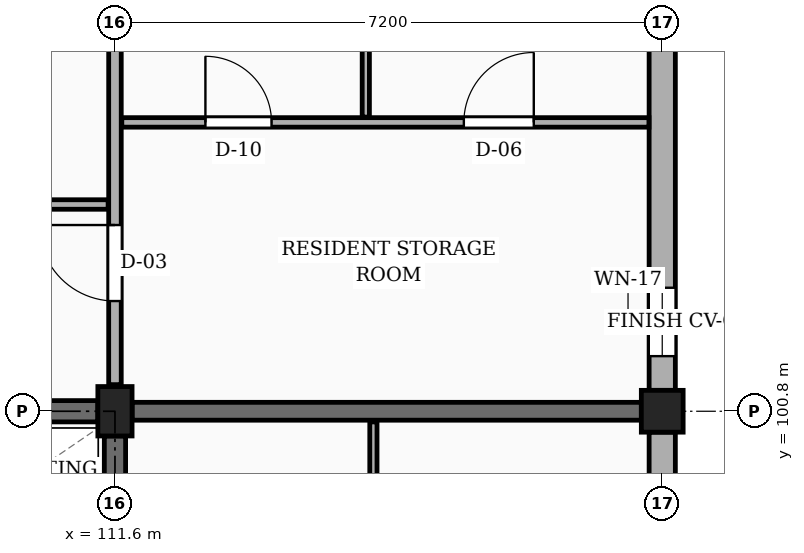
"""IFC4 building model, lengths in metres.
Left out: names, types, materials, properties, quantities, classifications, styles, units other than length and angle.
Written with IfcOpenShell. Run it as: python <this file> out.ifc"""

import sys

from ifc_helpers import new_model, si_unit, direction, frame, frame_2d, origin, origin_2d, place, context, subcontext, project, spatial, rectangle, extrude, element, fill, save


model = new_model("IFC4")
c1 = context("Model", 3, precision=1e-05, world=origin(), true_north=direction((0.0, 1.0)))
c2 = subcontext(c1, "Body", "Model", "MODEL_VIEW")
j1 = project(units=[si_unit("LENGTHUNIT", "METRE"), si_unit("PLANEANGLEUNIT", "RADIAN")], contexts=[c1])
p1 = place(None, origin())
s1 = spatial("IfcSite", under=j1, at=p1, CompositionType="ELEMENT")
p2 = place(p1, origin())
s2 = spatial("IfcBuilding", under=s1, at=p2, CompositionType="ELEMENT")
p3 = place(p2, frame((0.0, 0.0, 20.25)))
s3 = spatial("IfcBuildingStorey", under=s2, at=p3, CompositionType="ELEMENT", Elevation=20.25)
p4 = place(p3, frame((111.6, 100.8, 0.0), z_axis=(0.0, 0.0, 1.0), x_axis=(1.0, 0.0, 0.0)))
e1 = element("IfcColumn", 1, at=p4, inside=s3, PredefinedType="COLUMN", context=c2, shape_type="SweptSolid", body=[
    extrude(rectangle(XDim=0.45, YDim=0.65, at=origin_2d()), origin(), (0.0, 0.0, 1.0), 3.15),
])
p5 = place(p3, frame((118.8, 100.8, 0.0), z_axis=(0.0, 0.0, 1.0), x_axis=(1.0, 0.0, 0.0)))
e2 = element("IfcColumn", 2, at=p5, inside=s3, PredefinedType="COLUMN", context=c2, shape_type="SweptSolid", body=[
    extrude(rectangle(XDim=0.55, YDim=0.55, at=origin_2d()), origin(), (0.0, 0.0, 1.0), 3.15),
])
p6 = place(p3, frame((111.825, 100.8, 0.0), z_axis=(0.0, 0.0, 1.0), x_axis=(1.0, 0.0, 0.0)))
e3 = element("IfcWall", 3, at=p6, inside=s3, PredefinedType="SOLIDWALL", context=c2, shape_type="SweptSolid", body=[
    extrude(rectangle(XDim=6.7, YDim=0.235, at=frame_2d((3.35, 0.0))), origin(), (0.0, 0.0, 1.0), 2.19),
])
p7 = place(p3, frame((118.8, 93.875, 0.0), z_axis=(0.0, 0.0, 1.0), x_axis=(0.0, 1.0, 0.0)))
e4 = element("IfcWall", 4, at=p7, inside=s3, PredefinedType="SOLIDWALL", context=c2, shape_type="SweptSolid", body=[
    extrude(rectangle(XDim=6.65, YDim=0.345, at=frame_2d((3.325, 0.0))), origin(), (0.0, 0.0, 1.0), 2.46),
])
p8 = place(p7, frame((0.45, 0.0, 0.78)))
e5 = element("IfcOpeningElement", 5, at=p8, cuts=e4, PredefinedType="OPENING", context=c2, shape_type="SweptSolid", body=[
    extrude(rectangle(XDim=1.36, YDim=1.26, at=frame_2d((0.68, 0.63))), frame((0.0, 0.183, 0.0), z_axis=(0.0, -1.0, 0.0), x_axis=(1.0, 0.0, 0.0)), (0.0, 0.0, 1.0), 0.365),
])
p9 = place(p7, frame((4.65, 0.0, 0.78)))
e6 = element("IfcOpeningElement", 6, at=p9, cuts=e4, PredefinedType="OPENING", context=c2, shape_type="SweptSolid", body=[
    extrude(rectangle(XDim=0.9, YDim=1.36, at=frame_2d((0.45, 0.68))), frame((0.0, 0.183, 0.0), z_axis=(0.0, -1.0, 0.0), x_axis=(1.0, 0.0, 0.0)), (0.0, 0.0, 1.0), 0.365),
])
p10 = place(p3, frame((118.8, 101.075, 0.0), z_axis=(0.0, 0.0, 1.0), x_axis=(0.0, 1.0, 0.0)))
e7 = element("IfcWall", 7, at=p10, inside=s3, PredefinedType="SOLIDWALL", context=c2, shape_type="SweptSolid", body=[
    extrude(rectangle(XDim=6.65, YDim=0.345, at=frame_2d((3.325, 0.0))), origin(), (0.0, 0.0, 1.0), 2.46),
])
p11 = place(p10, frame((0.45, 0.0, 0.78)))
e8 = element("IfcOpeningElement", 8, at=p11, cuts=e7, PredefinedType="OPENING", context=c2, shape_type="SweptSolid", body=[
    extrude(rectangle(XDim=0.9, YDim=1.36, at=frame_2d((0.45, 0.68))), frame((0.0, 0.183, 0.0), z_axis=(0.0, -1.0, 0.0), x_axis=(1.0, 0.0, 0.0)), (0.0, 0.0, 1.0), 0.365),
])
p12 = place(p10, frame((4.65, 0.0, 0.78)))
e9 = element("IfcOpeningElement", 9, at=p12, cuts=e7, PredefinedType="OPENING", context=c2, shape_type="SweptSolid", body=[
    extrude(rectangle(XDim=1.06, YDim=1.36, at=frame_2d((0.53, 0.68))), frame((0.0, 0.183, 0.0), z_axis=(0.0, -1.0, 0.0), x_axis=(1.0, 0.0, 0.0)), (0.0, 0.0, 1.0), 0.365),
])
p13 = place(p3, frame((104.625, 100.8, 0.0), z_axis=(0.0, 0.0, 1.0), x_axis=(1.0, 0.0, 0.0)))
e10 = element("IfcWall", 10, at=p13, inside=s3, PredefinedType="SHEAR", context=c2, shape_type="SweptSolid", body=[
    extrude(rectangle(XDim=6.75, YDim=0.28, at=frame_2d((3.375, 0.0))), origin(), (0.0, 0.0, 1.0), 2.89),
])
p14 = place(p3, frame((111.6, 93.925, 0.0), z_axis=(0.0, 0.0, 1.0), x_axis=(0.0, 1.0, 0.0)))
e11 = element("IfcWall", 11, at=p14, inside=s3, PredefinedType="SHEAR", context=c2, shape_type="SweptSolid", body=[
    extrude(rectangle(XDim=6.55, YDim=0.28, at=frame_2d((3.275, 0.0))), origin(), (0.0, 0.0, 1.0), 2.89),
])
p15 = place(p3, frame((111.6, 101.15, 0.0), z_axis=(0.0, 0.0, 1.0), x_axis=(0.0, 1.0, 0.0)))
e12 = element("IfcWall", 12, at=p15, inside=s3, PredefinedType="PARTITIONING", context=c2, shape_type="SweptSolid", body=[
    extrude(rectangle(XDim=6.5, YDim=0.165, at=frame_2d((3.25, 0.0))), origin(), (0.0, 0.0, 1.0), 2.325),
])
p16 = place(p15, frame((1.1, 0.0, 0.0)))
e13 = element("IfcOpeningElement", 13, at=p16, cuts=e12, PredefinedType="OPENING", context=c2, shape_type="SweptSolid", body=[
    extrude(rectangle(XDim=1.0, YDim=2.15, at=frame_2d((0.5, 1.075))), frame((0.0, 0.093, 0.0), z_axis=(0.0, -1.0, 0.0), x_axis=(1.0, 0.0, 0.0)), (0.0, 0.0, 1.0), 0.185),
])
p17 = place(p3, frame((115.0, 96.97, 0.0), z_axis=(0.0, 0.0, 1.0), x_axis=(0.0, 1.0, 0.0)))
e14 = element("IfcWall", 14, at=p17, inside=s3, PredefinedType="PARTITIONING", context=c2, shape_type="SweptSolid", body=[
    extrude(rectangle(XDim=3.69, YDim=0.095, at=frame_2d((1.845, 0.0))), origin(), (0.0, 0.0, 1.0), 2.325),
])
p18 = place(p3, frame((104.49, 103.52, 0.0), z_axis=(0.0, 0.0, 1.0), x_axis=(1.0, 0.0, 0.0)))
e15 = element("IfcWall", 15, at=p18, inside=s3, PredefinedType="PARTITIONING", context=c2, shape_type="SweptSolid", body=[
    extrude(rectangle(XDim=7.02, YDim=0.125, at=frame_2d((3.51, 0.0))), origin(), (0.0, 0.0, 1.0), 2.325),
])
p19 = place(p18, frame((2.85, 0.0, 0.0)))
e16 = element("IfcOpeningElement", 16, at=p19, cuts=e15, PredefinedType="OPENING", context=c2, shape_type="SweptSolid", body=[
    extrude(rectangle(XDim=1.02, YDim=2.15, at=frame_2d((0.51, 1.075))), frame((0.0, 0.073, 0.0), z_axis=(0.0, -1.0, 0.0), x_axis=(1.0, 0.0, 0.0)), (0.0, 0.0, 1.0), 0.145),
])
p20 = place(p3, frame((111.69, 104.6, 0.0), z_axis=(0.0, 0.0, 1.0), x_axis=(1.0, 0.0, 0.0)))
e17 = element("IfcWall", 17, at=p20, inside=s3, PredefinedType="PARTITIONING", context=c2, shape_type="SweptSolid", body=[
    extrude(rectangle(XDim=6.935, YDim=0.125, at=frame_2d((3.468, 0.0))), origin(), (0.0, 0.0, 1.0), 2.325),
])
p21 = place(p20, frame((1.1, 0.0, 0.0)))
e18 = element("IfcOpeningElement", 18, at=p21, cuts=e17, PredefinedType="OPENING", context=c2, shape_type="SweptSolid", body=[
    extrude(rectangle(XDim=0.87, YDim=2.05, at=frame_2d((0.435, 1.025))), frame((0.0, 0.073, 0.0), z_axis=(0.0, -1.0, 0.0), x_axis=(1.0, 0.0, 0.0)), (0.0, 0.0, 1.0), 0.145),
])
p22 = place(p20, frame((4.5, 0.0, 0.0)))
e19 = element("IfcOpeningElement", 19, at=p22, cuts=e17, PredefinedType="OPENING", context=c2, shape_type="SweptSolid", body=[
    extrude(rectangle(XDim=0.92, YDim=2.1, at=frame_2d((0.46, 1.05))), frame((0.0, 0.073, 0.0), z_axis=(0.0, -1.0, 0.0), x_axis=(1.0, 0.0, 0.0)), (0.0, 0.0, 1.0), 0.145),
])
p23 = place(p3, frame((114.9, 104.67, 0.0), z_axis=(0.0, 0.0, 1.0), x_axis=(0.0, 1.0, 0.0)))
e20 = element("IfcWall", 20, at=p23, inside=s3, PredefinedType="PARTITIONING", context=c2, shape_type="SweptSolid", body=[
    extrude(rectangle(XDim=3.19, YDim=0.095, at=frame_2d((1.595, 0.0))), origin(), (0.0, 0.0, 1.0), 2.325),
])
p24 = place(p11, origin())
e21 = element("IfcWindow", 21, at=p24, inside=s3, PartitioningType="SINGLE_PANEL", PredefinedType="WINDOW", context=c2, shape_type="SweptSolid", body=[
    extrude(rectangle(XDim=0.9, YDim=1.36, at=frame_2d((0.45, 0.68))), frame((0.0, 0.03, 0.0), z_axis=(0.0, -1.0, 0.0), x_axis=(1.0, 0.0, 0.0)), (0.0, 0.0, 1.0), 0.06),
])
fill(e8, e21)
p25 = place(p16, origin())
e22 = element("IfcDoor", 22, at=p25, inside=s3, OperationType="SINGLE_SWING_RIGHT", PredefinedType="DOOR", context=c2, shape_type="SweptSolid", body=[
    extrude(rectangle(XDim=1.0, YDim=2.15, at=frame_2d((0.5, 1.075))), frame((0.0, 0.025, 0.0), z_axis=(0.0, -1.0, 0.0), x_axis=(1.0, 0.0, 0.0)), (0.0, 0.0, 1.0), 0.05),
])
fill(e13, e22)
p26 = place(p21, origin())
e23 = element("IfcDoor", 23, at=p26, inside=s3, OperationType="SINGLE_SWING_LEFT", PredefinedType="DOOR", context=c2, shape_type="SweptSolid", body=[
    extrude(rectangle(XDim=0.87, YDim=2.05, at=frame_2d((0.435, 1.025))), frame((0.0, 0.025, 0.0), z_axis=(0.0, -1.0, 0.0), x_axis=(1.0, 0.0, 0.0)), (0.0, 0.0, 1.0), 0.05),
])
fill(e18, e23)
p27 = place(p22, origin())
e24 = element("IfcDoor", 24, at=p27, inside=s3, OperationType="SINGLE_SWING_RIGHT", PredefinedType="DOOR", context=c2, shape_type="SweptSolid", body=[
    extrude(rectangle(XDim=0.92, YDim=2.1, at=frame_2d((0.46, 1.05))), frame((0.0, 0.025, 0.0), z_axis=(0.0, -1.0, 0.0), x_axis=(1.0, 0.0, 0.0)), (0.0, 0.0, 1.0), 0.05),
])
fill(e19, e24)
save(model, sys.argv[1])
